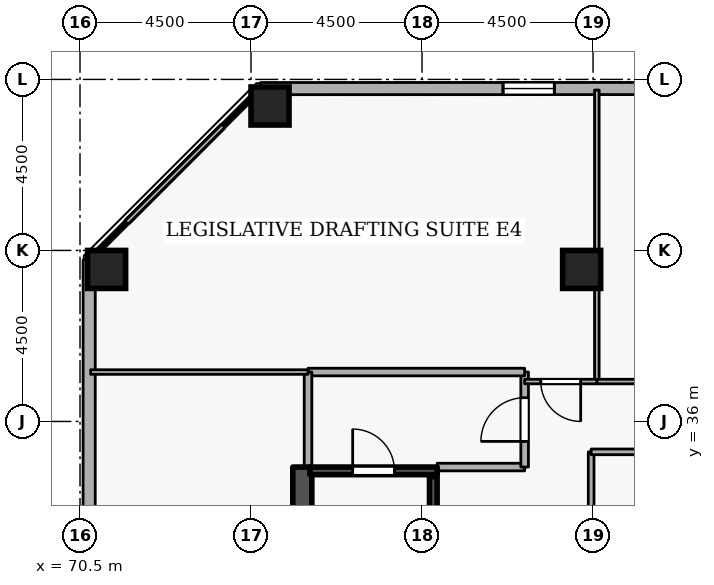
"""IFC4 building model, lengths in metres.
Left out: names, types, materials, properties, quantities, classifications, styles, units other than length and angle.
Written with IfcOpenShell. Run it as: python <this file> out.ifc"""

import sys

from ifc_helpers import new_model, si_unit, direction, frame, frame_2d, origin, origin_2d, place, context, subcontext, project, spatial, rectangle, extrude, element, fill, save


model = new_model("IFC4")
c1 = context("Model", 3, precision=1e-05, world=origin(), true_north=direction((0.0, 1.0)))
c2 = subcontext(c1, "Body", "Model", "MODEL_VIEW")
j1 = project(units=[si_unit("LENGTHUNIT", "METRE"), si_unit("PLANEANGLEUNIT", "RADIAN")], contexts=[c1])
p1 = place(None, origin())
s1 = spatial("IfcSite", under=j1, at=p1, CompositionType="ELEMENT")
p2 = place(p1, origin())
s2 = spatial("IfcBuilding", under=s1, at=p2, CompositionType="ELEMENT")
p3 = place(p2, frame((0.0, 0.0, 251.1)))
s3 = spatial("IfcBuildingStorey", under=s2, at=p3, CompositionType="ELEMENT", Elevation=251.1)
p4 = place(p3, frame((76.35, 19.2, 0.0), z_axis=(0.0, 0.0, 1.0), x_axis=(0.0, 1.0, 0.0)))
e1 = element("IfcWall", 1, at=p4, inside=s3, PredefinedType="SHEAR", context=c2, shape_type="SweptSolid", body=[
    extrude(rectangle(XDim=15.6, YDim=0.5, at=frame_2d((7.8, 0.0))), origin(), (0.0, 0.0, 1.0), 3.6),
])
for number, where, z_axis, x_axis in (
    (2, (75.5, 44.3, 0.0), (0.0, 0.0, 1.0), (1.0, 0.0, 0.0)),
    (3, (71.2, 40.0, 0.0), (0.0, 0.0, 1.0), (1.0, 0.0, 0.0)),
    (4, (83.7, 40.0, 0.0), (0.0, 0.0, 1.0), (1.0, 0.0, 0.0)),
):
    element("IfcColumn", number, at=place(p3, frame(where, z_axis=z_axis, x_axis=x_axis)), inside=s3, PredefinedType="COLUMN", context=c2, shape_type="SweptSolid", body=[
        extrude(rectangle(XDim=1.0, YDim=1.0, at=origin_2d()), origin(), (0.0, 0.0, 1.0), 3.6),
    ])
p5 = place(p3, frame((109.681, 44.765, 0.0), z_axis=(0.0, 0.0, 1.0), x_axis=(-0.999999983007, -0.000184351399, 0.0)))
e5 = element("IfcWall", 5, at=p5, inside=s3, PredefinedType="STANDARD", context=c2, shape_type="SweptSolid", body=[
    extrude(rectangle(XDim=34.432, YDim=0.32, at=frame_2d((17.216, 0.0))), origin(), (0.0, 0.0, 1.0), 2.22),
])
p6 = place(p5, frame((2.7, 0.0, 0.72)))
e6 = element("IfcOpeningElement", 6, at=p6, cuts=e5, PredefinedType="OPENING", context=c2, shape_type="SweptSolid", body=[
    extrude(rectangle(XDim=1.35, YDim=1.05, at=frame_2d((0.675, 0.525))), frame((0.0, 0.17, 0.0), z_axis=(0.0, -1.0, 0.0), x_axis=(1.0, 0.0, 0.0)), (0.0, 0.0, 1.0), 0.34),
])
p7 = place(p5, frame((12.3, 0.0, 0.72)))
e7 = element("IfcOpeningElement", 7, at=p7, cuts=e5, PredefinedType="OPENING", context=c2, shape_type="SweptSolid", body=[
    extrude(rectangle(XDim=1.35, YDim=1.05, at=frame_2d((0.675, 0.525))), frame((0.0, 0.17, 0.0), z_axis=(0.0, -1.0, 0.0), x_axis=(1.0, 0.0, 0.0)), (0.0, 0.0, 1.0), 0.34),
])
p8 = place(p5, frame((17.1, 0.0, 0.72)))
e8 = element("IfcOpeningElement", 8, at=p8, cuts=e5, PredefinedType="OPENING", context=c2, shape_type="SweptSolid", body=[
    extrude(rectangle(XDim=1.35, YDim=1.05, at=frame_2d((0.675, 0.525))), frame((0.0, 0.17, 0.0), z_axis=(0.0, -1.0, 0.0), x_axis=(1.0, 0.0, 0.0)), (0.0, 0.0, 1.0), 0.34),
])
p9 = place(p5, frame((26.7, 0.0, 0.72)))
e9 = element("IfcOpeningElement", 9, at=p9, cuts=e5, PredefinedType="OPENING", context=c2, shape_type="SweptSolid", body=[
    extrude(rectangle(XDim=1.35, YDim=1.05, at=frame_2d((0.675, 0.525))), frame((0.0, 0.17, 0.0), z_axis=(0.0, -1.0, 0.0), x_axis=(1.0, 0.0, 0.0)), (0.0, 0.0, 1.0), 0.34),
])
p10 = place(p3, frame((70.742, 40.251, 0.0), z_axis=(0.0, 0.0, 1.0), x_axis=(-0.000184351399, -0.999999983007, 0.0)))
e10 = element("IfcWall", 10, at=p10, inside=s3, PredefinedType="STANDARD", context=c2, shape_type="SweptSolid", body=[
    extrude(rectangle(XDim=34.432, YDim=0.32, at=frame_2d((17.216, 0.0))), origin(), (0.0, 0.0, 1.0), 2.22),
])
p11 = place(p10, frame((7.5, 0.0, 0.72)))
e11 = element("IfcOpeningElement", 11, at=p11, cuts=e10, PredefinedType="OPENING", context=c2, shape_type="SweptSolid", body=[
    extrude(rectangle(XDim=1.35, YDim=1.05, at=frame_2d((0.675, 0.525))), frame((0.0, 0.17, 0.0), z_axis=(0.0, -1.0, 0.0), x_axis=(1.0, 0.0, 0.0)), (0.0, 0.0, 1.0), 0.34),
])
p12 = place(p10, frame((17.1, 0.0, 0.72)))
e12 = element("IfcOpeningElement", 12, at=p12, cuts=e10, PredefinedType="OPENING", context=c2, shape_type="SweptSolid", body=[
    extrude(rectangle(XDim=1.35, YDim=1.05, at=frame_2d((0.675, 0.525))), frame((0.0, 0.17, 0.0), z_axis=(0.0, -1.0, 0.0), x_axis=(1.0, 0.0, 0.0)), (0.0, 0.0, 1.0), 0.34),
])
p13 = place(p3, frame((76.55, 34.7, 0.0), z_axis=(0.0, 0.0, 1.0), x_axis=(1.0, 0.0, 0.0)))
e13 = element("IfcWall", 13, at=p13, inside=s3, PredefinedType="SHEAR", context=c2, shape_type="SweptSolid", body=[
    extrude(rectangle(XDim=3.35, YDim=0.2, at=frame_2d((1.675, 0.0))), origin(), (0.0, 0.0, 1.0), 3.6),
])
p14 = place(p13, frame((1.125, 0.0, 0.0)))
e14 = element("IfcOpeningElement", 14, at=p14, cuts=e13, PredefinedType="OPENING", context=c2, shape_type="SweptSolid", body=[
    extrude(rectangle(XDim=1.1, YDim=2.1, at=frame_2d((0.55, 1.05))), frame((0.0, 0.11, 0.0), z_axis=(0.0, -1.0, 0.0), x_axis=(1.0, 0.0, 0.0)), (0.0, 0.0, 1.0), 0.22),
])
p15 = place(p3, frame((79.797, 27.45, 0.0), z_axis=(0.0, 0.0, 1.0), x_axis=(0.0, 1.0, 0.0)))
e15 = element("IfcWall", 15, at=p15, inside=s3, PredefinedType="SHEAR", context=c2, shape_type="SweptSolid", body=[
    extrude(rectangle(XDim=7.1, YDim=0.2, at=frame_2d((3.55, 0.0))), origin(), (0.0, 0.0, 1.0), 3.6),
])
p16 = place(p3, frame((79.9, 34.8, 0.0), z_axis=(0.0, 0.0, 1.0), x_axis=(1.0, 0.0, 0.0)))
e16 = element("IfcWall", 16, at=p16, inside=s3, PredefinedType="STANDARD", context=c2, shape_type="SweptSolid", body=[
    extrude(rectangle(XDim=2.3, YDim=0.2, at=frame_2d((1.15, 0.0))), origin(), (0.0, 0.0, 1.0), 2.525),
])
p17 = place(p3, frame((82.2, 34.8, 0.0), z_axis=(0.0, 0.0, 1.0), x_axis=(0.0, 1.0, 0.0)))
e17 = element("IfcWall", 17, at=p17, inside=s3, PredefinedType="STANDARD", context=c2, shape_type="SweptSolid", body=[
    extrude(rectangle(XDim=2.5, YDim=0.2, at=frame_2d((1.25, 0.0))), origin(), (0.0, 0.0, 1.0), 3.32),
])
p18 = place(p17, frame((0.675, 0.0, 0.0)))
e18 = element("IfcOpeningElement", 18, at=p18, cuts=e17, PredefinedType="OPENING", context=c2, shape_type="SweptSolid", body=[
    extrude(rectangle(XDim=1.15, YDim=2.1, at=frame_2d((0.575, 1.05))), frame((0.0, 0.11, 0.0), z_axis=(0.0, -1.0, 0.0), x_axis=(1.0, 0.0, 0.0)), (0.0, 0.0, 1.0), 0.22),
])
p19 = place(p3, frame((82.2, 37.3, 0.0), z_axis=(0.0, 0.0, 1.0), x_axis=(-1.0, 0.0, 0.0)))
e19 = element("IfcWall", 19, at=p19, inside=s3, PredefinedType="STANDARD", context=c2, shape_type="SweptSolid", body=[
    extrude(rectangle(XDim=5.7, YDim=0.2, at=frame_2d((2.85, 0.0))), origin(), (0.0, 0.0, 1.0), 3.32),
])
p20 = place(p3, frame((76.5, 37.3, 0.0), z_axis=(0.0, 0.0, 1.0), x_axis=(0.0, -1.0, 0.0)))
e20 = element("IfcWall", 20, at=p20, inside=s3, PredefinedType="STANDARD", context=c2, shape_type="SweptSolid", body=[
    extrude(rectangle(XDim=2.5, YDim=0.2, at=frame_2d((1.25, 0.0))), origin(), (0.0, 0.0, 1.0), 3.32),
])
p21 = place(p3, frame((84.1, 37.05, 0.0), z_axis=(0.0, 0.0, 1.0), x_axis=(0.0, 1.0, 0.0)))
e21 = element("IfcWall", 21, at=p21, inside=s3, PredefinedType="PARTITIONING", context=c2, shape_type="SweptSolid", body=[
    extrude(rectangle(XDim=7.67, YDim=0.12, at=frame_2d((3.835, 0.0))), origin(), (0.0, 0.0, 1.0), 3.32),
])
p22 = place(p3, frame((88.9, 37.05, 0.0), z_axis=(0.0, 0.0, 1.0), x_axis=(-1.0, 0.0, 0.0)))
e22 = element("IfcWall", 22, at=p22, inside=s3, PredefinedType="PARTITIONING", context=c2, shape_type="SweptSolid", body=[
    extrude(rectangle(XDim=4.8, YDim=0.12, at=frame_2d((2.4, 0.0))), origin(), (0.0, 0.0, 1.0), 3.32),
])
p23 = place(p22, frame((1.925, 0.0, 0.0)))
e23 = element("IfcOpeningElement", 23, at=p23, cuts=e22, PredefinedType="OPENING", context=c2, shape_type="SweptSolid", body=[
    extrude(rectangle(XDim=0.95, YDim=2.1, at=frame_2d((0.475, 1.05))), frame((0.0, 0.07, 0.0), z_axis=(0.0, -1.0, 0.0), x_axis=(1.0, 0.0, 0.0)), (0.0, 0.0, 1.0), 0.14),
])
p24 = place(p3, frame((76.5, 37.3, 0.0), z_axis=(0.0, 0.0, 1.0), x_axis=(-1.0, 0.0, 0.0)))
e24 = element("IfcWall", 24, at=p24, inside=s3, PredefinedType="PARTITIONING", context=c2, shape_type="SweptSolid", body=[
    extrude(rectangle(XDim=5.72, YDim=0.12, at=frame_2d((2.86, 0.0))), origin(), (0.0, 0.0, 1.0), 3.32),
])
p25 = place(p3, frame((70.78, 40.287, 0.0), z_axis=(0.0, 0.0, 1.0), x_axis=(0.707106781187, 0.707106781187, 0.0)))
e25 = element("IfcWall", 25, at=p25, inside=s3, PredefinedType="PARTITIONING", context=c2, shape_type="SweptSolid", body=[
    extrude(rectangle(XDim=6.269, YDim=0.12, at=frame_2d((3.134, 0.0))), origin(), (0.0, 0.0, 1.0), 3.32),
])
p26 = place(p3, frame((84.1, 37.05, 0.0), z_axis=(0.0, 0.0, 1.0), x_axis=(-1.0, 0.0, 0.0)))
e26 = element("IfcWall", 26, at=p26, inside=s3, PredefinedType="PARTITIONING", context=c2, shape_type="SweptSolid", body=[
    extrude(rectangle(XDim=1.9, YDim=0.12, at=frame_2d((0.95, 0.0))), origin(), (0.0, 0.0, 1.0), 3.32),
])
p27 = place(p26, frame((0.425, 0.0, 0.0)))
e27 = element("IfcOpeningElement", 27, at=p27, cuts=e26, PredefinedType="OPENING", context=c2, shape_type="SweptSolid", body=[
    extrude(rectangle(XDim=1.05, YDim=2.1, at=frame_2d((0.525, 1.05))), frame((0.0, 0.07, 0.0), z_axis=(0.0, -1.0, 0.0), x_axis=(1.0, 0.0, 0.0)), (0.0, 0.0, 1.0), 0.14),
])
p28 = place(p3, frame((83.95, 32.2, 0.0), z_axis=(0.0, 0.0, 1.0), x_axis=(0.0, 1.0, 0.0)))
e28 = element("IfcWall", 28, at=p28, inside=s3, PredefinedType="PARTITIONING", context=c2, shape_type="SweptSolid", body=[
    extrude(rectangle(XDim=3.0, YDim=0.15, at=frame_2d((1.5, 0.0))), origin(), (0.0, 0.0, 1.0), 3.32),
])
p29 = place(p3, frame((83.95, 35.2, 0.0), z_axis=(0.0, 0.0, 1.0), x_axis=(1.0, 0.0, 0.0)))
e29 = element("IfcWall", 29, at=p29, inside=s3, PredefinedType="PARTITIONING", context=c2, shape_type="SweptSolid", body=[
    extrude(rectangle(XDim=4.0, YDim=0.15, at=frame_2d((2.0, 0.0))), origin(), (0.0, 0.0, 1.0), 3.32),
])
p30 = place(p29, frame((1.35, 0.0, 0.0)))
e30 = element("IfcOpeningElement", 30, at=p30, cuts=e29, PredefinedType="OPENING", context=c2, shape_type="SweptSolid", body=[
    extrude(rectangle(XDim=1.3, YDim=2.12, at=frame_2d((0.65, 1.06))), frame((0.0, 0.085, 0.0), z_axis=(0.0, -1.0, 0.0), x_axis=(1.0, 0.0, 0.0)), (0.0, 0.0, 1.0), 0.17),
])
p31 = place(p9, origin())
e31 = element("IfcWindow", 31, at=p31, inside=s3, PartitioningType="SINGLE_PANEL", PredefinedType="WINDOW", context=c2, shape_type="SweptSolid", body=[
    extrude(rectangle(XDim=1.35, YDim=1.05, at=frame_2d((0.675, 0.525))), frame((0.0, 0.03, 0.0), z_axis=(0.0, -1.0, 0.0), x_axis=(1.0, 0.0, 0.0)), (0.0, 0.0, 1.0), 0.06),
])
fill(e9, e31)
p32 = place(p14, origin())
e32 = element("IfcDoor", 32, at=p32, inside=s3, OperationType="SINGLE_SWING_LEFT", PredefinedType="DOOR", context=c2, shape_type="SweptSolid", body=[
    extrude(rectangle(XDim=1.1, YDim=2.1, at=frame_2d((0.55, 1.05))), frame((0.0, 0.025, 0.0), z_axis=(0.0, -1.0, 0.0), x_axis=(1.0, 0.0, 0.0)), (0.0, 0.0, 1.0), 0.05),
])
fill(e14, e32)
p33 = place(p18, origin())
e33 = element("IfcDoor", 33, at=p33, inside=s3, OperationType="SINGLE_SWING_LEFT", PredefinedType="DOOR", context=c2, shape_type="SweptSolid", body=[
    extrude(rectangle(XDim=1.15, YDim=2.1, at=frame_2d((0.575, 1.05))), frame((0.0, 0.025, 0.0), z_axis=(0.0, -1.0, 0.0), x_axis=(1.0, 0.0, 0.0)), (0.0, 0.0, 1.0), 0.05),
])
fill(e18, e33)
p34 = place(p27, origin())
e34 = element("IfcDoor", 34, at=p34, inside=s3, OperationType="SINGLE_SWING_LEFT", PredefinedType="DOOR", context=c2, shape_type="SweptSolid", body=[
    extrude(rectangle(XDim=1.05, YDim=2.1, at=frame_2d((0.525, 1.05))), frame((0.0, 0.025, 0.0), z_axis=(0.0, -1.0, 0.0), x_axis=(1.0, 0.0, 0.0)), (0.0, 0.0, 1.0), 0.05),
])
fill(e27, e34)
save(model, sys.argv[1])
